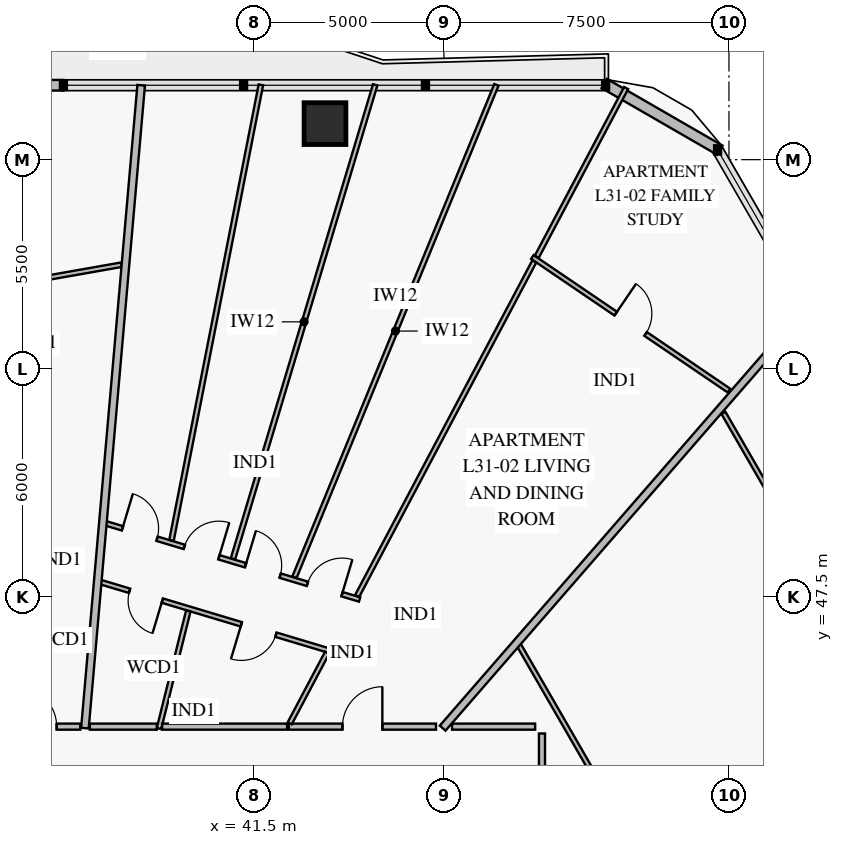
"""IFC4 building model, lengths in metres.
Left out: names, types, materials, properties, quantities, classifications, styles, units other than length and angle.
Written with IfcOpenShell. Run it as: python <this file> out.ifc"""

import sys

from ifc_helpers import new_model, si_unit, direction, frame, frame_2d, origin, origin_2d, place, context, subcontext, project, spatial, rectangle, extrude, element, fill, save


model = new_model("IFC4")
c1 = context("Model", 3, precision=1e-05, world=origin(), true_north=direction((0.0, 1.0)))
c2 = subcontext(c1, "Body", "Model", "MODEL_VIEW")
j1 = project(units=[si_unit("LENGTHUNIT", "METRE"), si_unit("PLANEANGLEUNIT", "RADIAN")], contexts=[c1])
p1 = place(None, origin())
s1 = spatial("IfcSite", under=j1, at=p1, CompositionType="ELEMENT")
p2 = place(p1, origin())
s2 = spatial("IfcBuilding", under=s1, at=p2, CompositionType="ELEMENT")
p3 = place(p2, frame((0.0, 0.0, 126.6)))
s3 = spatial("IfcBuildingStorey", under=s2, at=p3, CompositionType="ELEMENT", Elevation=126.6)
p4 = place(p3, frame((43.37, 59.948, 0.0), z_axis=(0.0, 0.0, 1.0), x_axis=(-1.0, 0.0, 0.0)))
e1 = element("IfcColumn", 1, at=p4, inside=s3, PredefinedType="COLUMN", context=c2, shape_type="SweptSolid", body=[
    extrude(rectangle(XDim=1.1, YDim=1.1, at=origin_2d()), origin(), (0.0, 0.0, 1.0), 3.55),
])
p5 = place(p3, frame((34.697, 60.958, 0.0), z_axis=(0.0, 0.0, 1.0), x_axis=(1.0, 0.0, 0.0)))
e2 = element("IfcWall", 2, at=p5, inside=s3, PredefinedType="SOLIDWALL", context=c2, shape_type="SweptSolid", body=[
    extrude(rectangle(XDim=1.79, YDim=0.28, at=frame_2d((0.895, 0.0))), origin(), (0.0, 0.0, 1.0), 3.55),
])
p6 = place(p5, frame((0.345, 0.0, 0.0)))
e3 = element("IfcOpeningElement", 3, at=p6, cuts=e2, PredefinedType="OPENING", context=c2, shape_type="SweptSolid", body=[
    extrude(rectangle(XDim=1.1, YDim=2.2, at=frame_2d((0.55, 1.1))), frame((0.0, 0.152, 0.0), z_axis=(0.0, -1.0, 0.0), x_axis=(1.0, 0.0, 0.0)), (0.0, 0.0, 1.0), 0.304),
])
p7 = place(p3, frame((50.717, 61.006, 0.0), z_axis=(0.0, 0.0, 1.0), x_axis=(0.866007452331, -0.500031091541, 0.0)))
e4 = element("IfcWall", 4, at=p7, inside=s3, PredefinedType="SOLIDWALL", context=c2, shape_type="SweptSolid", body=[
    extrude(rectangle(XDim=3.515, YDim=0.28, at=frame_2d((1.757, 0.0))), origin(), (0.0, 0.0, 1.0), 3.55),
])
p8 = place(p3, frame((52.232, 39.763, 0.0), z_axis=(0.0, 0.0, 1.0), x_axis=(0.902143295933, 0.43143652326, 0.0)))
e5 = element("IfcWall", 5, at=p8, inside=s3, PredefinedType="PARTITIONING", context=c2, shape_type="SweptSolid", body=[
    extrude(rectangle(XDim=7.74, YDim=0.12, at=frame_2d((3.87, 0.0))), origin(), (0.0, 0.0, 1.0), 3.1),
])
p9 = place(p8, frame((3.37, 0.0, 0.0)))
e6 = element("IfcOpeningElement", 6, at=p9, cuts=e5, PredefinedType="OPENING", context=c2, shape_type="SweptSolid", body=[
    extrude(rectangle(XDim=0.95, YDim=2.1, at=frame_2d((0.475, 1.05))), frame((0.0, 0.072, 0.0), z_axis=(0.0, -1.0, 0.0), x_axis=(1.0, 0.0, 0.0)), (0.0, 0.0, 1.0), 0.144),
])
p10 = place(p3, frame((59.158, 43.151, 0.0), z_axis=(0.0, 0.0, 1.0), x_axis=(-0.500002146898, 0.866024164269, 0.0)))
e7 = element("IfcWall", 7, at=p10, inside=s3, PredefinedType="PARTITIONING", context=c2, shape_type="SweptSolid", body=[
    extrude(rectangle(XDim=10.604, YDim=0.12, at=frame_2d((5.302, 0.0))), origin(), (0.0, 0.0, 1.0), 2.85),
])
p11 = place(p10, frame((4.742, 0.0, 0.0)))
e8 = element("IfcOpeningElement", 8, at=p11, cuts=e7, PredefinedType="OPENING", context=c2, shape_type="SweptSolid", body=[
    extrude(rectangle(XDim=0.95, YDim=2.1, at=frame_2d((0.475, 1.05))), frame((0.0, 0.072, 0.0), z_axis=(0.0, -1.0, 0.0), x_axis=(1.0, 0.0, 0.0)), (0.0, 0.0, 1.0), 0.144),
])
p12 = place(p3, frame((54.001, 52.923, 0.0), z_axis=(0.0, 0.0, 1.0), x_axis=(-0.827088330425, 0.562071964854, 0.0)))
e9 = element("IfcWall", 9, at=p12, inside=s3, PredefinedType="PARTITIONING", context=c2, shape_type="SweptSolid", body=[
    extrude(rectangle(XDim=6.256, YDim=0.12, at=frame_2d((3.128, 0.0))), origin(), (0.0, 0.0, 1.0), 3.55),
])
p13 = place(p12, frame((2.653, 0.0, 0.0)))
e10 = element("IfcOpeningElement", 10, at=p13, cuts=e9, PredefinedType="OPENING", context=c2, shape_type="SweptSolid", body=[
    extrude(rectangle(XDim=0.95, YDim=2.1, at=frame_2d((0.475, 1.05))), frame((0.0, 0.072, 0.0), z_axis=(0.0, -1.0, 0.0), x_axis=(1.0, 0.0, 0.0)), (0.0, 0.0, 1.0), 0.144),
])
p14 = place(p3, frame((43.556, 46.057, 0.0), z_axis=(0.0, 0.0, 1.0), x_axis=(-0.957822082652, 0.287361893759, 0.0)))
e11 = element("IfcWall", 11, at=p14, inside=s3, PredefinedType="PARTITIONING", context=c2, shape_type="SweptSolid", body=[
    extrude(rectangle(XDim=6.396, YDim=0.12, at=frame_2d((3.198, 0.0))), origin(), (0.0, 0.0, 1.0), 2.85),
])
p15 = place(p14, frame((1.542, 0.0, 0.0)))
e12 = element("IfcOpeningElement", 12, at=p15, cuts=e11, PredefinedType="OPENING", context=c2, shape_type="SweptSolid", body=[
    extrude(rectangle(XDim=0.95, YDim=2.1, at=frame_2d((0.475, 1.05))), frame((0.0, 0.072, 0.0), z_axis=(0.0, -1.0, 0.0), x_axis=(1.0, 0.0, 0.0)), (0.0, 0.0, 1.0), 0.144),
])
p16 = place(p14, frame((4.663, 0.0, 0.0)))
e13 = element("IfcOpeningElement", 13, at=p16, cuts=e11, PredefinedType="OPENING", context=c2, shape_type="SweptSolid", body=[
    extrude(rectangle(XDim=0.9, YDim=2.1, at=frame_2d((0.45, 1.05))), frame((0.0, 0.072, 0.0), z_axis=(0.0, -1.0, 0.0), x_axis=(1.0, 0.0, 0.0)), (0.0, 0.0, 1.0), 0.144),
])
p17 = place(p3, frame((44.281, 47.426, 0.0), z_axis=(0.0, 0.0, 1.0), x_axis=(-0.957812840143, 0.287392698684, 0.0)))
e14 = element("IfcWall", 14, at=p17, inside=s3, PredefinedType="PARTITIONING", context=c2, shape_type="SweptSolid", body=[
    extrude(rectangle(XDim=6.997, YDim=0.12, at=frame_2d((3.499, 0.0))), origin(), (0.0, 0.0, 1.0), 2.85),
])
p18 = place(p17, frame((0.483, 0.0, 0.0)))
e15 = element("IfcOpeningElement", 15, at=p18, cuts=e14, PredefinedType="OPENING", context=c2, shape_type="SweptSolid", body=[
    extrude(rectangle(XDim=0.95, YDim=2.1, at=frame_2d((0.475, 1.05))), frame((0.0, 0.072, 0.0), z_axis=(0.0, -1.0, 0.0), x_axis=(1.0, 0.0, 0.0)), (0.0, 0.0, 1.0), 0.144),
])
p19 = place(p17, frame((2.182, 0.0, 0.0)))
e16 = element("IfcOpeningElement", 16, at=p19, cuts=e14, PredefinedType="OPENING", context=c2, shape_type="SweptSolid", body=[
    extrude(rectangle(XDim=0.95, YDim=2.1, at=frame_2d((0.475, 1.05))), frame((0.0, 0.072, 0.0), z_axis=(0.0, -1.0, 0.0), x_axis=(1.0, 0.0, 0.0)), (0.0, 0.0, 1.0), 0.144),
])
p20 = place(p17, frame((3.865, 0.0, 0.0)))
e17 = element("IfcOpeningElement", 17, at=p20, cuts=e14, PredefinedType="OPENING", context=c2, shape_type="SweptSolid", body=[
    extrude(rectangle(XDim=0.95, YDim=2.1, at=frame_2d((0.475, 1.05))), frame((0.0, 0.072, 0.0), z_axis=(0.0, -1.0, 0.0), x_axis=(1.0, 0.0, 0.0)), (0.0, 0.0, 1.0), 0.144),
])
p21 = place(p17, frame((5.564, 0.0, 0.0)))
e18 = element("IfcOpeningElement", 18, at=p21, cuts=e14, PredefinedType="OPENING", context=c2, shape_type="SweptSolid", body=[
    extrude(rectangle(XDim=0.95, YDim=2.1, at=frame_2d((0.475, 1.05))), frame((0.0, 0.072, 0.0), z_axis=(0.0, -1.0, 0.0), x_axis=(1.0, 0.0, 0.0)), (0.0, 0.0, 1.0), 0.144),
])
p22 = place(p3, frame((46.291, 44.08, 0.0), z_axis=(0.0, 0.0, 1.0), x_axis=(-1.0, 0.0, 0.0)))
e19 = element("IfcWall", 19, at=p22, inside=s3, PredefinedType="PARTITIONING", context=c2, shape_type="SweptSolid", body=[
    extrude(rectangle(XDim=3.872, YDim=0.16, at=frame_2d((1.936, 0.0))), origin(), (0.0, 0.0, 1.0), 3.55),
])
p23 = place(p22, frame((1.411, 0.0, 0.0)))
e20 = element("IfcOpeningElement", 20, at=p23, cuts=e19, PredefinedType="OPENING", context=c2, shape_type="SweptSolid", body=[
    extrude(rectangle(XDim=1.05, YDim=2.15, at=frame_2d((0.525, 1.075))), frame((0.0, 0.092, 0.0), z_axis=(0.0, -1.0, 0.0), x_axis=(1.0, 0.0, 0.0)), (0.0, 0.0, 1.0), 0.184),
])
p24 = place(p3, frame((38.008, 56.234, 0.0), z_axis=(0.0, 0.0, 1.0), x_axis=(-0.984810882198, -0.173630430239, 0.0)))
e21 = element("IfcWall", 21, at=p24, inside=s3, PredefinedType="PARTITIONING", context=c2, shape_type="SweptSolid", body=[
    extrude(rectangle(XDim=4.855, YDim=0.12, at=frame_2d((2.428, 0.0))), origin(), (0.0, 0.0, 1.0), 3.55),
])
p25 = place(p24, frame((1.953, 0.0, 0.0)))
e22 = element("IfcOpeningElement", 22, at=p25, cuts=e21, PredefinedType="OPENING", context=c2, shape_type="SweptSolid", body=[
    extrude(rectangle(XDim=0.95, YDim=2.1, at=frame_2d((0.475, 1.05))), frame((0.0, 0.072, 0.0), z_axis=(0.0, -1.0, 0.0), x_axis=(1.0, 0.0, 0.0)), (0.0, 0.0, 1.0), 0.144),
])
p26 = place(p3, frame((36.931, 44.08, 0.0), z_axis=(0.0, 0.0, 1.0), x_axis=(-1.0, 0.0, 0.0)))
e23 = element("IfcWall", 23, at=p26, inside=s3, PredefinedType="PARTITIONING", context=c2, shape_type="SweptSolid", body=[
    extrude(rectangle(XDim=2.291, YDim=0.16, at=frame_2d((1.146, 0.0))), origin(), (0.0, 0.0, 1.0), 3.55),
])
p27 = place(p26, frame((0.621, 0.0, 0.0)))
e24 = element("IfcOpeningElement", 24, at=p27, cuts=e23, PredefinedType="OPENING", context=c2, shape_type="SweptSolid", body=[
    extrude(rectangle(XDim=1.05, YDim=2.15, at=frame_2d((0.525, 1.075))), frame((0.0, 0.092, 0.0), z_axis=(0.0, -1.0, 0.0), x_axis=(1.0, 0.0, 0.0)), (0.0, 0.0, 1.0), 0.184),
])
p28 = place(p3, frame((52.176, 39.812, 0.0), z_axis=(0.0, 0.0, 1.0), x_axis=(-0.499998637326, 0.866026190523, 0.0)))
e25 = element("IfcWall", 25, at=p28, inside=s3, PredefinedType="PARTITIONING", context=c2, shape_type="SweptSolid", body=[
    extrude(rectangle(XDim=7.422, YDim=0.12, at=frame_2d((3.711, 0.0))), origin(), (0.0, 0.0, 1.0), 2.85),
])
p29 = place(p3, frame((46.466, 44.04, 0.0), z_axis=(0.0, 0.0, 1.0), x_axis=(0.656061723069, 0.754707238287, 0.0)))
e26 = element("IfcWall", 26, at=p29, inside=s3, PredefinedType="PARTITIONING", context=c2, shape_type="SweptSolid", body=[
    extrude(rectangle(XDim=14.674, YDim=0.2, at=frame_2d((7.337, 0.0))), origin(), (0.0, 0.0, 1.0), 2.8),
])
p30 = place(p3, frame((39.002, 44.03, 0.0), z_axis=(0.0, 0.0, 1.0), x_axis=(0.242048665755, 0.97026411013, 0.0)))
e27 = element("IfcWall", 27, at=p30, inside=s3, PredefinedType="PARTITIONING", context=c2, shape_type="SweptSolid", body=[
    extrude(rectangle(XDim=3.185, YDim=0.12, at=frame_2d((1.593, 0.0))), origin(), (0.0, 0.0, 1.0), 2.85),
])
p31 = place(p3, frame((42.567, 48.011, 0.0), z_axis=(0.0, 0.0, 1.0), x_axis=(0.379443868759, 0.925214759103, 0.0)))
e28 = element("IfcWall", 28, at=p31, inside=s3, PredefinedType="PARTITIONING", context=c2, shape_type="SweptSolid", body=[
    extrude(rectangle(XDim=14.005, YDim=0.12, at=frame_2d((7.002, 0.0))), origin(), (0.0, 0.0, 1.0), 2.8),
])
p32 = place(p3, frame((40.949, 48.497, 0.0), z_axis=(0.0, 0.0, 1.0), x_axis=(0.287356486292, 0.957823704961, 0.0)))
e29 = element("IfcWall", 29, at=p32, inside=s3, PredefinedType="PARTITIONING", context=c2, shape_type="SweptSolid", body=[
    extrude(rectangle(XDim=13.021, YDim=0.12, at=frame_2d((6.51, 0.0))), origin(), (0.0, 0.0, 1.0), 2.8),
])
p33 = place(p3, frame((39.332, 48.982, 0.0), z_axis=(0.0, 0.0, 1.0), x_axis=(0.192513335822, 0.98129435723, 0.0)))
e30 = element("IfcWall", 30, at=p33, inside=s3, PredefinedType="PARTITIONING", context=c2, shape_type="SweptSolid", body=[
    extrude(rectangle(XDim=12.215, YDim=0.12, at=frame_2d((6.107, 0.0))), origin(), (0.0, 0.0, 1.0), 2.8),
])
p34 = place(p3, frame((42.443, 44.168, 0.0), z_axis=(0.0, 0.0, 1.0), x_axis=(0.467962467615, 0.883748340255, 0.0)))
e31 = element("IfcWall", 31, at=p34, inside=s3, PredefinedType="PARTITIONING", context=c2, shape_type="SweptSolid", body=[
    extrude(rectangle(XDim=2.101, YDim=0.12, at=frame_2d((1.05, 0.0))), origin(), (0.0, 0.0, 1.0), 3.55),
])
p35 = place(p3, frame((44.216, 47.517, 0.0), z_axis=(0.0, 0.0, 1.0), x_axis=(0.467901230601, 0.883780763765, 0.0)))
e32 = element("IfcWall", 32, at=p35, inside=s3, PredefinedType="PARTITIONING", context=c2, shape_type="SweptSolid", body=[
    extrude(rectangle(XDim=9.963, YDim=0.12, at=frame_2d((4.982, 0.0))), origin(), (0.0, 0.0, 1.0), 3.1),
])
p36 = place(p3, frame((48.942, 56.443, 0.0), z_axis=(0.0, 0.0, 1.0), x_axis=(0.467903344083, 0.883779644819, 0.0)))
e33 = element("IfcWall", 33, at=p36, inside=s3, PredefinedType="PARTITIONING", context=c2, shape_type="SweptSolid", body=[
    extrude(rectangle(XDim=5.026, YDim=0.12, at=frame_2d((2.513, 0.0))), origin(), (0.0, 0.0, 1.0), 2.8),
])
p37 = place(p3, frame((37.053, 44.04, 0.0), z_axis=(0.0, 0.0, 1.0), x_axis=(0.087144480826, 0.996195683318, 0.0)))
e34 = element("IfcWall", 34, at=p37, inside=s3, PredefinedType="PARTITIONING", context=c2, shape_type="SweptSolid", body=[
    extrude(rectangle(XDim=16.983, YDim=0.2, at=frame_2d((8.492, 0.0))), origin(), (0.0, 0.0, 1.0), 2.8),
])
p38 = place(p3, frame((49.08, 38.331, 0.0), z_axis=(0.0, 0.0, 1.0), x_axis=(0.0, 1.0, 0.0)))
e35 = element("IfcWall", 35, at=p38, inside=s3, PredefinedType="PARTITIONING", context=c2, shape_type="SweptSolid", body=[
    extrude(rectangle(XDim=5.569, YDim=0.16, at=frame_2d((2.784, 0.0))), origin(), (0.0, 0.0, 1.0), 3.55),
])
p39 = place(p3, frame((48.9, 44.08, 0.0), z_axis=(0.0, 0.0, 1.0), x_axis=(-1.0, 0.0, 0.0)))
e36 = element("IfcWall", 36, at=p39, inside=s3, PredefinedType="PARTITIONING", context=c2, shape_type="SweptSolid", body=[
    extrude(rectangle(XDim=2.186, YDim=0.16, at=frame_2d((1.093, 0.0))), origin(), (0.0, 0.0, 1.0), 2.85),
])
p40 = place(p3, frame((42.373, 44.08, 0.0), z_axis=(0.0, 0.0, 1.0), x_axis=(-1.0, 0.0, 0.0)))
e37 = element("IfcWall", 37, at=p40, inside=s3, PredefinedType="PARTITIONING", context=c2, shape_type="SweptSolid", body=[
    extrude(rectangle(XDim=3.289, YDim=0.16, at=frame_2d((1.644, 0.0))), origin(), (0.0, 0.0, 1.0), 2.85),
])
p41 = place(p3, frame((38.945, 44.08, 0.0), z_axis=(0.0, 0.0, 1.0), x_axis=(-1.0, 0.0, 0.0)))
e38 = element("IfcWall", 38, at=p41, inside=s3, PredefinedType="PARTITIONING", context=c2, shape_type="SweptSolid", body=[
    extrude(rectangle(XDim=1.761, YDim=0.16, at=frame_2d((0.881, 0.0))), origin(), (0.0, 0.0, 1.0), 3.55),
])
p42 = place(p13, frame((0.95, 0.0, 0.0), z_axis=(0.0, 0.0, 1.0), x_axis=(-1.0, 0.0, 0.0)))
e39 = element("IfcDoor", 39, at=p42, inside=s3, OperationType="SINGLE_SWING_LEFT", PredefinedType="DOOR", context=c2, shape_type="SweptSolid", body=[
    extrude(rectangle(XDim=0.95, YDim=2.1, at=frame_2d((0.475, 1.05))), frame((0.0, 0.025, 0.0), z_axis=(0.0, -1.0, 0.0), x_axis=(1.0, 0.0, 0.0)), (0.0, 0.0, 1.0), 0.05),
])
fill(e10, e39)
p43 = place(p15, origin())
e40 = element("IfcDoor", 40, at=p43, inside=s3, OperationType="SINGLE_SWING_RIGHT", PredefinedType="DOOR", context=c2, shape_type="SweptSolid", body=[
    extrude(rectangle(XDim=0.95, YDim=2.1, at=frame_2d((0.475, 1.05))), frame((0.0, 0.025, 0.0), z_axis=(0.0, -1.0, 0.0), x_axis=(1.0, 0.0, 0.0)), (0.0, 0.0, 1.0), 0.05),
])
fill(e12, e40)
p44 = place(p16, origin())
e41 = element("IfcDoor", 41, at=p44, inside=s3, OperationType="SINGLE_SWING_LEFT", PredefinedType="DOOR", context=c2, shape_type="SweptSolid", body=[
    extrude(rectangle(XDim=0.9, YDim=2.1, at=frame_2d((0.45, 1.05))), frame((0.0, 0.025, 0.0), z_axis=(0.0, -1.0, 0.0), x_axis=(1.0, 0.0, 0.0)), (0.0, 0.0, 1.0), 0.05),
])
fill(e13, e41)
p45 = place(p18, frame((0.95, 0.0, 0.0), z_axis=(0.0, 0.0, 1.0), x_axis=(-1.0, 0.0, 0.0)))
e42 = element("IfcDoor", 42, at=p45, inside=s3, OperationType="SINGLE_SWING_RIGHT", PredefinedType="DOOR", context=c2, shape_type="SweptSolid", body=[
    extrude(rectangle(XDim=0.95, YDim=2.1, at=frame_2d((0.475, 1.05))), frame((0.0, 0.025, 0.0), z_axis=(0.0, -1.0, 0.0), x_axis=(1.0, 0.0, 0.0)), (0.0, 0.0, 1.0), 0.05),
])
fill(e15, e42)
p46 = place(p19, frame((0.95, 0.0, 0.0), z_axis=(0.0, 0.0, 1.0), x_axis=(-1.0, 0.0, 0.0)))
e43 = element("IfcDoor", 43, at=p46, inside=s3, OperationType="SINGLE_SWING_LEFT", PredefinedType="DOOR", context=c2, shape_type="SweptSolid", body=[
    extrude(rectangle(XDim=0.95, YDim=2.1, at=frame_2d((0.475, 1.05))), frame((0.0, 0.025, 0.0), z_axis=(0.0, -1.0, 0.0), x_axis=(1.0, 0.0, 0.0)), (0.0, 0.0, 1.0), 0.05),
])
fill(e16, e43)
p47 = place(p20, frame((0.95, 0.0, 0.0), z_axis=(0.0, 0.0, 1.0), x_axis=(-1.0, 0.0, 0.0)))
e44 = element("IfcDoor", 44, at=p47, inside=s3, OperationType="SINGLE_SWING_RIGHT", PredefinedType="DOOR", context=c2, shape_type="SweptSolid", body=[
    extrude(rectangle(XDim=0.95, YDim=2.1, at=frame_2d((0.475, 1.05))), frame((0.0, 0.025, 0.0), z_axis=(0.0, -1.0, 0.0), x_axis=(1.0, 0.0, 0.0)), (0.0, 0.0, 1.0), 0.05),
])
fill(e17, e44)
p48 = place(p21, frame((0.95, 0.0, 0.0), z_axis=(0.0, 0.0, 1.0), x_axis=(-1.0, 0.0, 0.0)))
e45 = element("IfcDoor", 45, at=p48, inside=s3, OperationType="SINGLE_SWING_LEFT", PredefinedType="DOOR", context=c2, shape_type="SweptSolid", body=[
    extrude(rectangle(XDim=0.95, YDim=2.1, at=frame_2d((0.475, 1.05))), frame((0.0, 0.025, 0.0), z_axis=(0.0, -1.0, 0.0), x_axis=(1.0, 0.0, 0.0)), (0.0, 0.0, 1.0), 0.05),
])
fill(e18, e45)
p49 = place(p23, frame((1.05, 0.0, 0.0), z_axis=(0.0, 0.0, 1.0), x_axis=(-1.0, 0.0, 0.0)))
e46 = element("IfcDoor", 46, at=p49, inside=s3, OperationType="SINGLE_SWING_RIGHT", PredefinedType="DOOR", context=c2, shape_type="SweptSolid", body=[
    extrude(rectangle(XDim=1.05, YDim=2.15, at=frame_2d((0.525, 1.075))), frame((0.0, 0.025, 0.0), z_axis=(0.0, -1.0, 0.0), x_axis=(1.0, 0.0, 0.0)), (0.0, 0.0, 1.0), 0.05),
])
fill(e20, e46)
p50 = place(p27, frame((1.05, 0.0, 0.0), z_axis=(0.0, 0.0, 1.0), x_axis=(-1.0, 0.0, 0.0)))
e47 = element("IfcDoor", 47, at=p50, inside=s3, OperationType="SINGLE_SWING_LEFT", PredefinedType="DOOR", context=c2, shape_type="SweptSolid", body=[
    extrude(rectangle(XDim=1.05, YDim=2.15, at=frame_2d((0.525, 1.075))), frame((0.0, 0.025, 0.0), z_axis=(0.0, -1.0, 0.0), x_axis=(1.0, 0.0, 0.0)), (0.0, 0.0, 1.0), 0.05),
])
fill(e24, e47)
save(model, sys.argv[1])
